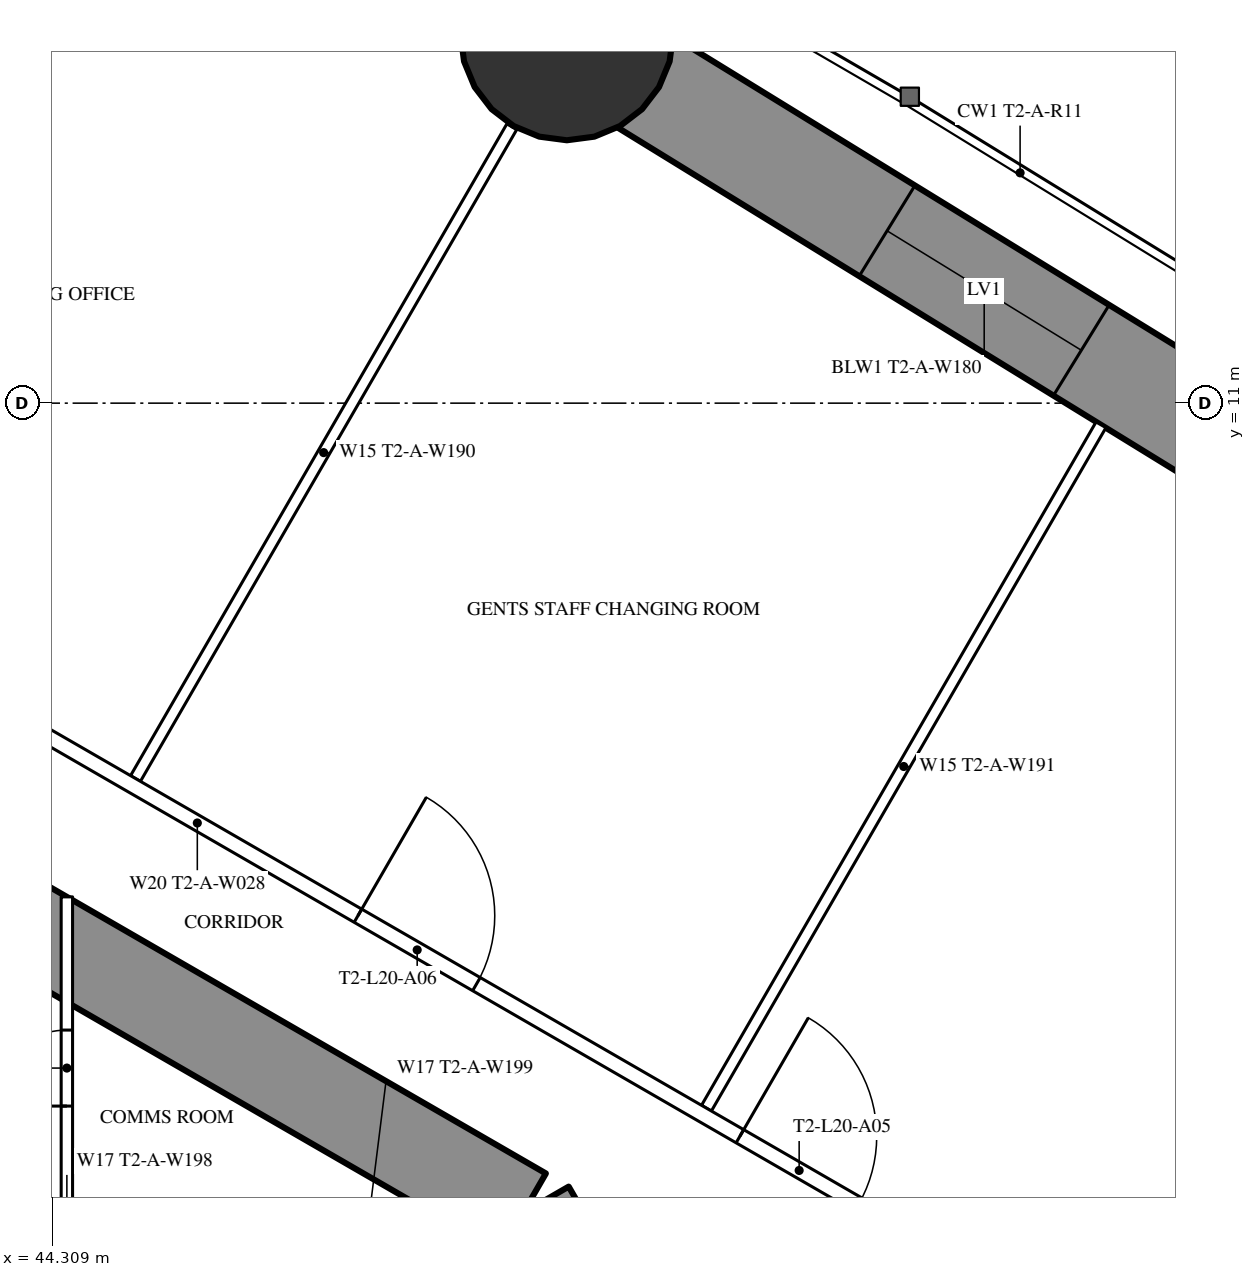
"""IFC4 building model, lengths in metres.
Left out: names, types, materials, properties, quantities, classifications, styles, units other than length and angle.
Written with IfcOpenShell. Run it as: python <this file> out.ifc"""

import sys

from ifc_helpers import new_model, si_unit, direction, frame, frame_2d, origin, origin_2d, place, context, subcontext, project, spatial, rectangle, hollow_circle, extrude, element, fill, save


model = new_model("IFC4")
c1 = context("Model", 3, precision=1e-05, world=origin(), true_north=direction((0.0, 1.0)))
c2 = subcontext(c1, "Body", "Model", "MODEL_VIEW")
j1 = project(units=[si_unit("LENGTHUNIT", "METRE"), si_unit("PLANEANGLEUNIT", "RADIAN")], contexts=[c1])
p1 = place(None, origin())
s1 = spatial("IfcSite", under=j1, at=p1, CompositionType="ELEMENT")
p2 = place(p1, origin())
s2 = spatial("IfcBuilding", under=s1, at=p2, CompositionType="ELEMENT")
p3 = place(p2, frame((0.0, 0.0, 77.5)))
s3 = spatial("IfcBuildingStorey", under=s2, at=p3, CompositionType="ELEMENT", Elevation=77.5)
p4 = place(p3, frame((51.078, 15.858, 0.0), z_axis=(0.0, 0.0, 1.0), x_axis=(1.0, 0.0, 0.0)))
e1 = element("IfcColumn", 1, at=p4, inside=s3, PredefinedType="COLUMN", context=c2, shape_type="SweptSolid", body=[
    extrude(hollow_circle(Radius=1.4, WallThickness=0.12, at=origin_2d()), origin(), (0.0, 0.0, 1.0), 3.5),
])
p5 = place(p3, frame((27.2, -13.8, 0.0), z_axis=(0.0, 0.0, 1.0), x_axis=(0.866027159892, 0.499996958321, 0.0)))
e2 = element("IfcWall", 2, at=p5, inside=s3, PredefinedType="SHEAR", context=c2, shape_type="SweptSolid", body=[
    extrude(rectangle(XDim=27.947, YDim=1.2, at=frame_2d((13.973, 0.0))), origin(), (0.0, 0.0, 1.0), 3.5),
])
p6 = place(p5, frame((5.65, 0.0, 0.0)))
e3 = element("IfcOpeningElement", 3, at=p6, cuts=e2, PredefinedType="OPENING", context=c2, shape_type="SweptSolid", body=[
    extrude(rectangle(XDim=1.0, YDim=2.2, at=frame_2d((0.5, 1.1))), frame((0.0, 0.61, 0.0), z_axis=(0.0, -1.0, 0.0), x_axis=(1.0, 0.0, 0.0)), (0.0, 0.0, 1.0), 1.22),
])
p7 = place(p5, frame((14.045, 0.0, 0.0)))
e4 = element("IfcOpeningElement", 4, at=p7, cuts=e2, PredefinedType="OPENING", context=c2, shape_type="SweptSolid", body=[
    extrude(rectangle(XDim=1.8, YDim=2.2, at=frame_2d((0.9, 1.1))), frame((0.0, 0.61, 0.0), z_axis=(0.0, -1.0, 0.0), x_axis=(1.0, 0.0, 0.0)), (0.0, 0.0, 1.0), 1.22),
])
p8 = place(p3, frame((27.2, 13.8, 0.0), z_axis=(0.0, 0.0, 1.0), x_axis=(0.866024515034, -0.500001539357, 0.0)))
e5 = element("IfcWall", 5, at=p8, inside=s3, PredefinedType="SHEAR", context=c2, shape_type="SweptSolid", body=[
    extrude(rectangle(XDim=26.907, YDim=1.2, at=frame_2d((13.454, 0.0))), origin(), (0.0, 0.0, 1.0), 3.5),
])
p9 = place(p8, frame((4.5, 0.0, 0.0)))
e6 = element("IfcOpeningElement", 6, at=p9, cuts=e5, PredefinedType="OPENING", context=c2, shape_type="SweptSolid", body=[
    extrude(rectangle(XDim=1.0, YDim=2.2, at=frame_2d((0.5, 1.1))), frame((0.0, 0.61, 0.0), z_axis=(0.0, -1.0, 0.0), x_axis=(1.0, 0.0, 0.0)), (0.0, 0.0, 1.0), 1.22),
])
p10 = place(p8, frame((12.545, 0.0, 0.0)))
e7 = element("IfcOpeningElement", 7, at=p10, cuts=e5, PredefinedType="OPENING", context=c2, shape_type="SweptSolid", body=[
    extrude(rectangle(XDim=1.8, YDim=2.2, at=frame_2d((0.9, 1.1))), frame((0.0, 0.61, 0.0), z_axis=(0.0, -1.0, 0.0), x_axis=(1.0, 0.0, 0.0)), (0.0, 0.0, 1.0), 1.22),
])
p11 = place(p3, frame((62.059, 9.105, 0.0), z_axis=(0.0, 0.0, 1.0), x_axis=(-0.851815628025, 0.523841708775, 0.0)))
e8 = element("IfcWall", 8, at=p11, inside=s3, PredefinedType="SHEAR", context=c2, shape_type="SweptSolid", body=[
    extrude(rectangle(XDim=12.892, YDim=1.4, at=frame_2d((6.446, 0.0))), origin(), (0.0, 0.0, 1.0), 3.5),
])
p12 = place(p11, frame((4.946, 0.0, 0.6)))
e9 = element("IfcOpeningElement", 9, at=p12, cuts=e8, PredefinedType="OPENING", context=c2, shape_type="SweptSolid", body=[
    extrude(rectangle(XDim=3.0, YDim=1.2, at=frame_2d((1.5, 0.6))), frame((0.0, 0.71, 0.0), z_axis=(0.0, -1.0, 0.0), x_axis=(1.0, 0.0, 0.0)), (0.0, 0.0, 1.0), 1.42),
])
p13 = place(p3, frame((51.078, 15.858, 0.0), z_axis=(0.0, 0.0, 1.0), x_axis=(-0.883403493655, 0.46861313191, 0.0)))
e10 = element("IfcWall", 10, at=p13, inside=s3, PredefinedType="SHEAR", context=c2, shape_type="SweptSolid", body=[
    extrude(rectangle(XDim=8.596, YDim=1.4, at=frame_2d((4.298, 0.0))), origin(), (0.0, 0.0, 1.0), 3.5),
])
p14 = place(p13, frame((2.798, 0.0, 0.6)))
e11 = element("IfcOpeningElement", 11, at=p14, cuts=e10, PredefinedType="OPENING", context=c2, shape_type="SweptSolid", body=[
    extrude(rectangle(XDim=3.0, YDim=1.2, at=frame_2d((1.5, 0.6))), frame((0.0, 0.71, 0.0), z_axis=(0.0, -1.0, 0.0), x_axis=(1.0, 0.0, 0.0)), (0.0, 0.0, 1.0), 1.42),
])
p15 = place(p3, frame((45.403, 6.062, 0.0), z_axis=(0.0, 0.0, 1.0), x_axis=(0.500013434677, 0.866017647131, 0.0)))
e12 = element("IfcWall", 12, at=p15, inside=s3, PredefinedType="PARTITIONING", context=c2, shape_type="SweptSolid", body=[
    extrude(rectangle(XDim=9.902, YDim=0.15, at=frame_2d((4.951, 0.0))), origin(), (0.0, 0.0, 1.0), 2.05),
])
p16 = place(p3, frame((52.915, 1.725, 0.0), z_axis=(0.0, 0.0, 1.0), x_axis=(0.499986436127, 0.866033234748, 0.0)))
e13 = element("IfcWall", 13, at=p16, inside=s3, PredefinedType="PARTITIONING", context=c2, shape_type="SweptSolid", body=[
    extrude(rectangle(XDim=10.381, YDim=0.15, at=frame_2d((5.19, 0.0))), origin(), (0.0, 0.0, 1.0), 3.25),
])
p17 = place(p3, frame((36.834, 10.894, 0.0), z_axis=(0.0, 0.0, 1.0), x_axis=(0.866028157229, -0.499995230863, 0.0)))
e14 = element("IfcWall", 14, at=p17, inside=s3, PredefinedType="PARTITIONING", context=c2, shape_type="SweptSolid", body=[
    extrude(rectangle(XDim=21.667, YDim=0.2, at=frame_2d((10.833, 0.0))), origin(), (0.0, 0.0, 1.0), 3.25),
])
p18 = place(p17, frame((19.076, 0.0, 0.0)))
e15 = element("IfcOpeningElement", 15, at=p18, cuts=e14, PredefinedType="OPENING", context=c2, shape_type="SweptSolid", body=[
    extrude(rectangle(XDim=1.8, YDim=2.04, at=frame_2d((0.9, 1.02))), frame((0.0, 0.11, 0.0), z_axis=(0.0, -1.0, 0.0), x_axis=(1.0, 0.0, 0.0)), (0.0, 0.0, 1.0), 0.22),
])
p19 = place(p17, frame((13.274, 0.0, 0.0)))
e16 = element("IfcOpeningElement", 16, at=p19, cuts=e14, PredefinedType="OPENING", context=c2, shape_type="SweptSolid", body=[
    extrude(rectangle(XDim=1.8, YDim=2.2, at=frame_2d((0.9, 1.1))), frame((0.0, 0.11, 0.0), z_axis=(0.0, -1.0, 0.0), x_axis=(1.0, 0.0, 0.0)), (0.0, 0.0, 1.0), 0.22),
])
p20 = place(p17, frame((4.602, 0.0, 0.0)))
e17 = element("IfcOpeningElement", 17, at=p20, cuts=e14, PredefinedType="OPENING", context=c2, shape_type="SweptSolid", body=[
    extrude(rectangle(XDim=1.8, YDim=2.2, at=frame_2d((0.9, 1.1))), frame((0.0, 0.11, 0.0), z_axis=(0.0, -1.0, 0.0), x_axis=(1.0, 0.0, 0.0)), (0.0, 0.0, 1.0), 0.22),
])
p21 = place(p3, frame((44.5, -4.505, 0.0), z_axis=(0.0, 0.0, 1.0), x_axis=(0.0, 1.0, 0.0)))
e18 = element("IfcWall", 18, at=p21, inside=s3, PredefinedType="PARTITIONING", context=c2, shape_type="SweptSolid", body=[
    extrude(rectangle(XDim=9.009, YDim=0.15, at=frame_2d((4.505, 0.0))), origin(), (0.0, 0.0, 1.0), 3.25),
])
p22 = place(p21, frame((1.752, 0.0, 0.0)))
e19 = element("IfcOpeningElement", 19, at=p22, cuts=e18, PredefinedType="OPENING", context=c2, shape_type="SweptSolid", body=[
    extrude(rectangle(XDim=1.0, YDim=2.2, at=frame_2d((0.5, 1.1))), frame((0.0, 0.085, 0.0), z_axis=(0.0, -1.0, 0.0), x_axis=(1.0, 0.0, 0.0)), (0.0, 0.0, 1.0), 0.17),
])
p23 = place(p21, frame((6.257, 0.0, 0.0)))
e20 = element("IfcOpeningElement", 20, at=p23, cuts=e18, PredefinedType="OPENING", context=c2, shape_type="SweptSolid", body=[
    extrude(rectangle(XDim=1.0, YDim=2.2, at=frame_2d((0.5, 1.1))), frame((0.0, 0.085, 0.0), z_axis=(0.0, -1.0, 0.0), x_axis=(1.0, 0.0, 0.0)), (0.0, 0.0, 1.0), 0.17),
])
p24 = place(p12, origin())
e21 = element("IfcWindow", 21, at=p24, inside=s3, PartitioningType="SINGLE_PANEL", PredefinedType="WINDOW", context=c2, shape_type="SweptSolid", body=[
    extrude(rectangle(XDim=3.0, YDim=1.2, at=frame_2d((1.5, 0.6))), frame((0.0, 0.03, 0.0), z_axis=(0.0, -1.0, 0.0), x_axis=(1.0, 0.0, 0.0)), (0.0, 0.0, 1.0), 0.06),
])
fill(e9, e21)
p25 = place(p18, origin())
e22 = element("IfcDoor", 22, at=p25, inside=s3, OperationType="DOUBLE_DOOR_SINGLE_SWING", PredefinedType="DOOR", context=c2, shape_type="SweptSolid", body=[
    extrude(rectangle(XDim=1.8, YDim=2.04, at=frame_2d((0.9, 1.02))), frame((0.0, 0.025, 0.0), z_axis=(0.0, -1.0, 0.0), x_axis=(1.0, 0.0, 0.0)), (0.0, 0.0, 1.0), 0.05),
])
fill(e15, e22)
p26 = place(p19, origin())
e23 = element("IfcDoor", 23, at=p26, inside=s3, OperationType="DOUBLE_DOOR_SINGLE_SWING", PredefinedType="DOOR", context=c2, shape_type="SweptSolid", body=[
    extrude(rectangle(XDim=1.8, YDim=2.2, at=frame_2d((0.9, 1.1))), frame((0.0, 0.025, 0.0), z_axis=(0.0, -1.0, 0.0), x_axis=(1.0, 0.0, 0.0)), (0.0, 0.0, 1.0), 0.05),
])
fill(e16, e23)
p27 = place(p23, origin())
e24 = element("IfcDoor", 24, at=p27, inside=s3, OperationType="SINGLE_SWING_LEFT", PredefinedType="DOOR", context=c2, shape_type="SweptSolid", body=[
    extrude(rectangle(XDim=1.0, YDim=2.2, at=frame_2d((0.5, 1.1))), frame((0.0, 0.025, 0.0), z_axis=(0.0, -1.0, 0.0), x_axis=(1.0, 0.0, 0.0)), (0.0, 0.0, 1.0), 0.05),
])
fill(e20, e24)
save(model, sys.argv[1])
